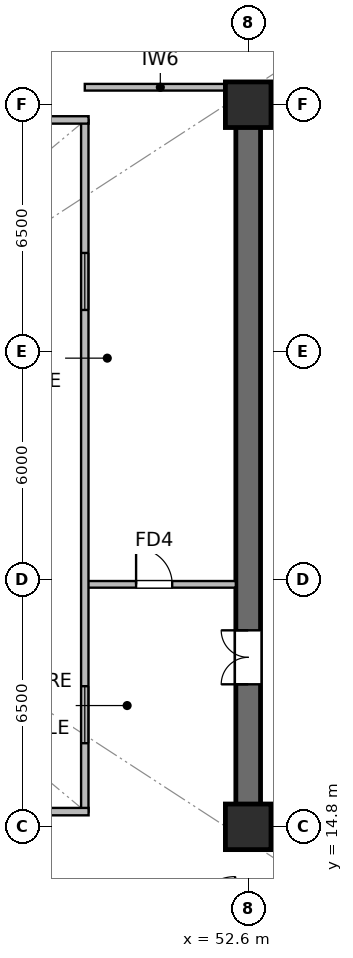
"""IFC4 building model, lengths in metres.
Left out: names, types, materials, properties, quantities, classifications, styles, units other than length and angle.
Written with IfcOpenShell. Run it as: python <this file> out.ifc"""

import sys

from ifc_helpers import new_model, si_unit, direction, frame, frame_2d, origin, origin_2d, place, context, subcontext, project, spatial, rectangle, extrude, source, transform, mapped, element, fill, save


model = new_model("IFC4")
c1 = context("Model", 3, precision=1e-05, world=origin(), true_north=direction((0.0, 1.0)))
c2 = subcontext(c1, "Body", "Model", "MODEL_VIEW")
j1 = project(units=[si_unit("LENGTHUNIT", "METRE"), si_unit("PLANEANGLEUNIT", "RADIAN")], contexts=[c1])
p1 = place(None, origin())
s1 = spatial("IfcSite", under=j1, at=p1, CompositionType="ELEMENT")
p2 = place(p1, origin())
s2 = spatial("IfcBuilding", under=s1, at=p2, CompositionType="ELEMENT")
p3 = place(p2, frame((0.0, 0.0, 100.3)))
s3 = spatial("IfcBuildingStorey", under=s2, at=p3, CompositionType="ELEMENT", Elevation=100.3)
p4 = place(p3, frame((52.275, 14.8, 0.0), z_axis=(0.0, 0.0, 1.0), x_axis=(1.0, 0.0, 0.0)))
e1 = element("IfcWall", 1, at=p4, inside=s3, PredefinedType="SHEAR", context=c2, shape_type="SweptSolid", body=[
    extrude(rectangle(XDim=15.45, YDim=0.65, at=frame_2d((7.725, 0.0))), origin(), (0.0, 0.0, 1.0), 4.49),
])
p5 = place(p3, frame((52.275, 33.8, 0.0), z_axis=(0.0, 0.0, 1.0), x_axis=(1.0, 0.0, 0.0)))
e2 = element("IfcWall", 2, at=p5, inside=s3, PredefinedType="SHEAR", context=c2, shape_type="SweptSolid", body=[
    extrude(rectangle(XDim=15.45, YDim=0.65, at=frame_2d((7.725, 0.0))), origin(), (0.0, 0.0, 1.0), 4.49),
])
p6 = place(p5, frame((8.825, 0.0, 0.0)))
e3 = element("IfcOpeningElement", 3, at=p6, cuts=e2, PredefinedType="OPENING", context=c2, shape_type="SweptSolid", body=[
    extrude(rectangle(XDim=0.95, YDim=2.15, at=frame_2d((0.475, 1.075))), frame((0.0, 0.335, 0.0), z_axis=(0.0, -1.0, 0.0), x_axis=(1.0, 0.0, 0.0)), (0.0, 0.0, 1.0), 0.67),
])
p7 = place(p5, frame((5.46, 0.0, 0.0)))
e4 = element("IfcOpeningElement", 4, at=p7, cuts=e2, PredefinedType="OPENING", context=c2, shape_type="SweptSolid", body=[
    extrude(rectangle(XDim=0.95, YDim=2.15, at=frame_2d((0.475, 1.075))), frame((0.0, 0.335, 0.0), z_axis=(0.0, -1.0, 0.0), x_axis=(1.0, 0.0, 0.0)), (0.0, 0.0, 1.0), 0.67),
])
p8 = place(p5, frame((2.06, 0.0, 0.0)))
e5 = element("IfcOpeningElement", 5, at=p8, cuts=e2, PredefinedType="OPENING", context=c2, shape_type="SweptSolid", body=[
    extrude(rectangle(XDim=0.95, YDim=2.15, at=frame_2d((0.475, 1.075))), frame((0.0, 0.335, 0.0), z_axis=(0.0, -1.0, 0.0), x_axis=(1.0, 0.0, 0.0)), (0.0, 0.0, 1.0), 0.67),
])
p9 = place(p3, frame((52.6, 15.125, 0.0), z_axis=(0.0, 0.0, 1.0), x_axis=(0.0, 1.0, 0.0)))
e6 = element("IfcWall", 6, at=p9, inside=s3, PredefinedType="SHEAR", context=c2, shape_type="SweptSolid", body=[
    extrude(rectangle(XDim=18.35, YDim=0.65, at=frame_2d((9.175, 0.0))), origin(), (0.0, 0.0, 1.0), 4.49),
])
p10 = place(p9, frame((3.425, 0.0, 0.0)))
e7 = element("IfcOpeningElement", 7, at=p10, cuts=e6, PredefinedType="OPENING", context=c2, shape_type="SweptSolid", body=[
    extrude(rectangle(XDim=1.42, YDim=2.2, at=frame_2d((0.71, 1.1))), frame((0.0, 0.335, 0.0), z_axis=(0.0, -1.0, 0.0), x_axis=(1.0, 0.0, 0.0)), (0.0, 0.0, 1.0), 0.67),
])
m1 = source(origin(), c2, "Body", "SweptSolid", [
    extrude(rectangle(XDim=1.2, YDim=1.2, at=origin_2d()), origin(), (0.0, 0.0, 1.0), 4.8),
])
for number, where, z_axis, x_axis in (
    (8, (52.6, 14.8, 0.0), (0.0, 0.0, 1.0), (1.0, 0.0, 0.0)),
    (9, (52.6, 33.8, 0.0), (0.0, 0.0, 1.0), (1.0, 0.0, 0.0)),
):
    element("IfcColumn", number, at=place(p3, frame(where, z_axis=z_axis, x_axis=x_axis)), inside=s3, PredefinedType="COLUMN", context=c2, shape_type="MappedRepresentation", body=[
        mapped(m1, transform((0.0, 0.0, 0.0), scale=1.0)),
    ])
p11 = place(p3, frame((48.3, 34.26, 0.0), z_axis=(0.0, 0.0, 1.0), x_axis=(1.0, 0.0, 0.0)))
e10 = element("IfcWall", 10, at=p11, inside=s3, PredefinedType="PARTITIONING", context=c2, shape_type="SweptSolid", body=[
    extrude(rectangle(XDim=3.975, YDim=0.175, at=frame_2d((1.987, 0.0))), origin(), (0.0, 0.0, 1.0), 4.175),
])
p12 = place(p3, frame((48.3, 21.18, 0.0), z_axis=(0.0, 0.0, 1.0), x_axis=(1.0, 0.0, 0.0)))
e11 = element("IfcWall", 11, at=p12, inside=s3, PredefinedType="PARTITIONING", context=c2, shape_type="SweptSolid", body=[
    extrude(rectangle(XDim=3.975, YDim=0.175, at=frame_2d((1.987, 0.0))), origin(), (0.0, 0.0, 1.0), 4.49),
])
p13 = place(p12, frame((1.35, 0.0, 0.0)))
e12 = element("IfcOpeningElement", 12, at=p13, cuts=e11, PredefinedType="OPENING", context=c2, shape_type="SweptSolid", body=[
    extrude(rectangle(XDim=0.95, YDim=2.15, at=frame_2d((0.475, 1.075))), frame((0.0, 0.098, 0.0), z_axis=(0.0, -1.0, 0.0), x_axis=(1.0, 0.0, 0.0)), (0.0, 0.0, 1.0), 0.195),
])
p14 = place(p3, frame((48.3, 15.2, 0.0), z_axis=(0.0, 0.0, 1.0), x_axis=(0.0, 1.0, 0.0)))
e13 = element("IfcWall", 13, at=p14, inside=s3, PredefinedType="SOLIDWALL", context=c2, shape_type="SweptSolid", body=[
    extrude(rectangle(XDim=18.2, YDim=0.195, at=frame_2d((9.1, 0.0))), origin(), (0.0, 0.0, 1.0), 4.49),
])
p15 = place(p14, frame((1.8, 0.0, 0.9)))
e14 = element("IfcOpeningElement", 14, at=p15, cuts=e13, PredefinedType="OPENING", context=c2, shape_type="SweptSolid", body=[
    extrude(rectangle(XDim=1.5, YDim=1.4, at=frame_2d((0.75, 0.7))), frame((0.0, 0.107, 0.0), z_axis=(0.0, -1.0, 0.0), x_axis=(1.0, 0.0, 0.0)), (0.0, 0.0, 1.0), 0.215),
])
p16 = place(p14, frame((13.2, 0.0, 0.9)))
e15 = element("IfcOpeningElement", 15, at=p16, cuts=e13, PredefinedType="OPENING", context=c2, shape_type="SweptSolid", body=[
    extrude(rectangle(XDim=1.5, YDim=1.4, at=frame_2d((0.75, 0.7))), frame((0.0, 0.107, 0.0), z_axis=(0.0, -1.0, 0.0), x_axis=(1.0, 0.0, 0.0)), (0.0, 0.0, 1.0), 0.215),
])
for number, where, z_axis, x_axis in (
    (16, (26.4, 15.2, 0.0), (0.0, 0.0, 1.0), (1.0, 0.0, 0.0)),
    (17, (26.4, 33.4, 0.0), (0.0, 0.0, 1.0), (1.0, 0.0, 0.0)),
):
    element("IfcWall", number, at=place(p3, frame(where, z_axis=z_axis, x_axis=x_axis)), inside=s3, PredefinedType="SOLIDWALL", context=c2, shape_type="SweptSolid", body=[
        extrude(rectangle(XDim=22.0, YDim=0.195, at=frame_2d((11.0, 0.0))), origin(), (0.0, 0.0, 1.0), 4.49),
    ])
m2 = source(origin(), c2, "Body", "SweptSolid", [
    extrude(rectangle(XDim=1.5, YDim=1.4, at=frame_2d((0.75, 0.7))), frame((0.0, 0.03, 0.0), z_axis=(0.0, -1.0, 0.0), x_axis=(1.0, 0.0, 0.0)), (0.0, 0.0, 1.0), 0.06),
])
p17 = place(p15, origin())
e18 = element("IfcWindow", 18, at=p17, inside=s3, PartitioningType="SINGLE_PANEL", PredefinedType="WINDOW", context=c2, shape_type="MappedRepresentation", body=[
    mapped(m2, transform((0.0, 0.0, 0.0), scale=1.0)),
])
fill(e14, e18)
p18 = place(p16, origin())
e19 = element("IfcWindow", 19, at=p18, inside=s3, PartitioningType="SINGLE_PANEL", PredefinedType="WINDOW", context=c2, shape_type="MappedRepresentation", body=[
    mapped(m2, transform((0.0, 0.0, 0.0), scale=1.0)),
])
fill(e15, e19)
m3 = source(origin(), c2, "Body", "SweptSolid", [
    extrude(rectangle(XDim=1.42, YDim=2.2, at=frame_2d((0.71, 1.1))), frame((0.0, 0.025, 0.0), z_axis=(0.0, -1.0, 0.0), x_axis=(1.0, 0.0, 0.0)), (0.0, 0.0, 1.0), 0.05),
])
p19 = place(p10, origin())
e20 = element("IfcDoor", 20, at=p19, inside=s3, OperationType="DOUBLE_DOOR_SINGLE_SWING", PredefinedType="DOOR", context=c2, shape_type="MappedRepresentation", body=[
    mapped(m3, transform((0.0, 0.0, 0.0), scale=1.0)),
])
fill(e7, e20)
m4 = source(origin(), c2, "Body", "SweptSolid", [
    extrude(rectangle(XDim=0.95, YDim=2.15, at=frame_2d((0.475, 1.075))), frame((0.0, 0.025, 0.0), z_axis=(0.0, -1.0, 0.0), x_axis=(1.0, 0.0, 0.0)), (0.0, 0.0, 1.0), 0.05),
])
p20 = place(p13, origin())
e21 = element("IfcDoor", 21, at=p20, inside=s3, OperationType="SINGLE_SWING_LEFT", PredefinedType="DOOR", context=c2, shape_type="MappedRepresentation", body=[
    mapped(m4, transform((0.0, 0.0, 0.0), scale=1.0)),
])
fill(e12, e21)
save(model, sys.argv[1])
